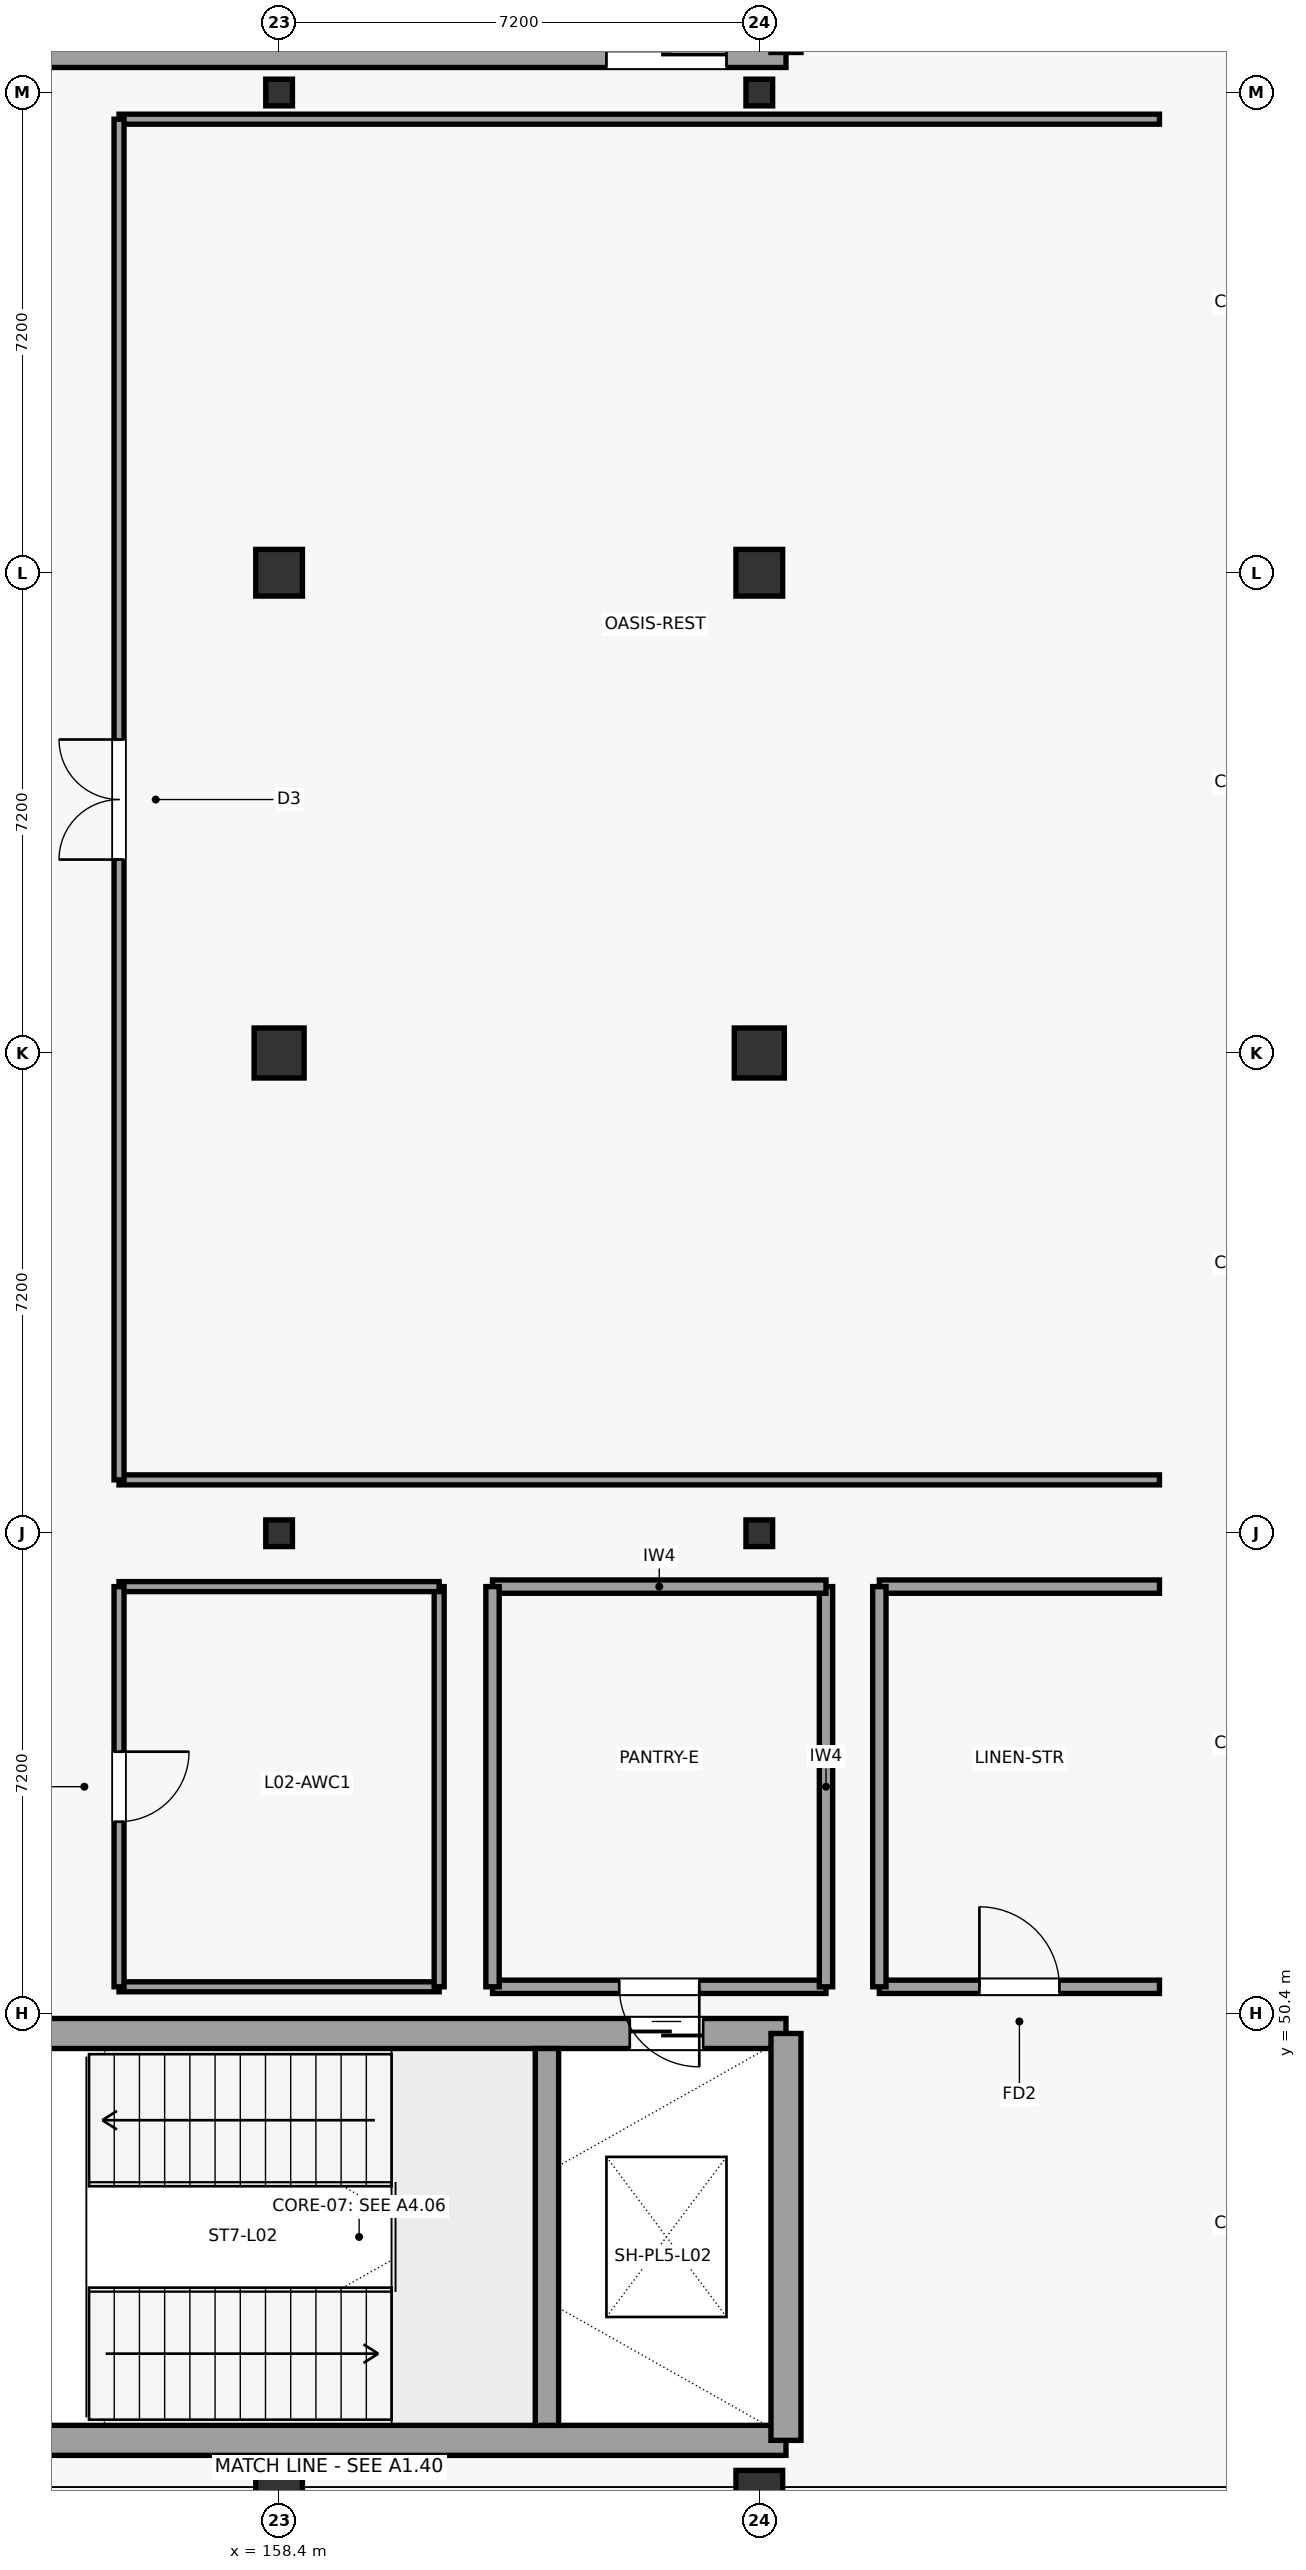
"""IFC4 building model, lengths in metres.
Left out: names, types, materials, properties, quantities, classifications, styles, units other than length and angle.
Written with IfcOpenShell. Run it as: python <this file> out.ifc"""

import sys

from ifc_helpers import new_model, si_unit, direction, frame, frame_2d, origin, origin_2d, place, context, subcontext, project, spatial, rectangle, hollow_rectangle, extrude, element, fill, save


model = new_model("IFC4")
c1 = context("Model", 3, precision=1e-05, world=origin(), true_north=direction((0.0, 1.0)))
c2 = subcontext(c1, "Body", "Model", "MODEL_VIEW")
j1 = project(units=[si_unit("LENGTHUNIT", "METRE"), si_unit("PLANEANGLEUNIT", "RADIAN")], contexts=[c1])
p1 = place(None, origin())
s1 = spatial("IfcSite", under=j1, at=p1, CompositionType="ELEMENT")
p2 = place(p1, origin())
s2 = spatial("IfcBuilding", under=s1, at=p2, CompositionType="ELEMENT")
p3 = place(p2, frame((0.0, 0.0, 9.6)))
s3 = spatial("IfcBuildingStorey", under=s2, at=p3, CompositionType="ELEMENT", Elevation=9.6)
p4 = place(p3, frame((158.4, 43.2, 0.0), z_axis=(0.0, 0.0, 1.0), x_axis=(1.0, 0.0, 0.0)))
e1 = element("IfcColumn", 1, at=p4, inside=s3, PredefinedType="COLUMN", context=c2, shape_type="SweptSolid", body=[
    extrude(rectangle(XDim=0.7, YDim=0.7, at=origin_2d()), origin(), (0.0, 0.0, 1.0), 4.2),
])
p5 = place(p3, frame((158.4, 57.6, 0.0), z_axis=(0.0, 0.0, 1.0), x_axis=(1.0, 0.0, 0.0)))
e2 = element("IfcColumn", 2, at=p5, inside=s3, PredefinedType="COLUMN", context=c2, shape_type="SweptSolid", body=[
    extrude(hollow_rectangle(XDim=0.4, YDim=0.4, WallThickness=0.02, at=origin_2d()), origin(), (0.0, 0.0, 1.0), 4.2),
])
p6 = place(p3, frame((158.4, 64.8, 0.0), z_axis=(0.0, 0.0, 1.0), x_axis=(1.0, 0.0, 0.0)))
e3 = element("IfcColumn", 3, at=p6, inside=s3, PredefinedType="COLUMN", context=c2, shape_type="SweptSolid", body=[
    extrude(rectangle(XDim=0.75, YDim=0.75, at=origin_2d()), origin(), (0.0, 0.0, 1.0), 4.2),
])
p7 = place(p3, frame((158.4, 72.0, 0.0), z_axis=(0.0, 0.0, 1.0), x_axis=(1.0, 0.0, 0.0)))
e4 = element("IfcColumn", 4, at=p7, inside=s3, PredefinedType="COLUMN", context=c2, shape_type="SweptSolid", body=[
    extrude(rectangle(XDim=0.7, YDim=0.7, at=origin_2d()), origin(), (0.0, 0.0, 1.0), 4.2),
])
p8 = place(p3, frame((158.4, 79.2, 0.0), z_axis=(0.0, 0.0, 1.0), x_axis=(1.0, 0.0, 0.0)))
e5 = element("IfcColumn", 5, at=p8, inside=s3, PredefinedType="COLUMN", context=c2, shape_type="SweptSolid", body=[
    extrude(hollow_rectangle(XDim=0.4, YDim=0.4, WallThickness=0.02, at=origin_2d()), origin(), (0.0, 0.0, 1.0), 4.2),
])
p9 = place(p3, frame((165.6, 43.2, 0.0), z_axis=(0.0, 0.0, 1.0), x_axis=(1.0, 0.0, 0.0)))
e6 = element("IfcColumn", 6, at=p9, inside=s3, PredefinedType="COLUMN", context=c2, shape_type="SweptSolid", body=[
    extrude(rectangle(XDim=0.7, YDim=0.7, at=origin_2d()), origin(), (0.0, 0.0, 1.0), 4.2),
])
p10 = place(p3, frame((165.6, 57.6, 0.0), z_axis=(0.0, 0.0, 1.0), x_axis=(1.0, 0.0, 0.0)))
e7 = element("IfcColumn", 7, at=p10, inside=s3, PredefinedType="COLUMN", context=c2, shape_type="SweptSolid", body=[
    extrude(hollow_rectangle(XDim=0.4, YDim=0.4, WallThickness=0.02, at=origin_2d()), origin(), (0.0, 0.0, 1.0), 4.2),
])
p11 = place(p3, frame((165.6, 64.8, 0.0), z_axis=(0.0, 0.0, 1.0), x_axis=(1.0, 0.0, 0.0)))
e8 = element("IfcColumn", 8, at=p11, inside=s3, PredefinedType="COLUMN", context=c2, shape_type="SweptSolid", body=[
    extrude(rectangle(XDim=0.75, YDim=0.75, at=origin_2d()), origin(), (0.0, 0.0, 1.0), 4.2),
])
p12 = place(p3, frame((165.6, 72.0, 0.0), z_axis=(0.0, 0.0, 1.0), x_axis=(1.0, 0.0, 0.0)))
e9 = element("IfcColumn", 9, at=p12, inside=s3, PredefinedType="COLUMN", context=c2, shape_type="SweptSolid", body=[
    extrude(rectangle(XDim=0.7, YDim=0.7, at=origin_2d()), origin(), (0.0, 0.0, 1.0), 4.2),
])
p13 = place(p3, frame((165.6, 79.2, 0.0), z_axis=(0.0, 0.0, 1.0), x_axis=(1.0, 0.0, 0.0)))
e10 = element("IfcColumn", 10, at=p13, inside=s3, PredefinedType="COLUMN", context=c2, shape_type="SweptSolid", body=[
    extrude(hollow_rectangle(XDim=0.4, YDim=0.4, WallThickness=0.02, at=origin_2d()), origin(), (0.0, 0.0, 1.0), 4.2),
])
p14 = place(p3, frame((153.2, 44.0, 0.0), z_axis=(0.0, 0.0, 1.0), x_axis=(1.0, 0.0, 0.0)))
e11 = element("IfcWall", 11, at=p14, inside=s3, PredefinedType="SHEAR", context=c2, shape_type="SweptSolid", body=[
    extrude(rectangle(XDim=12.8, YDim=0.45, at=frame_2d((6.4, 0.0))), origin(), (0.0, 0.0, 1.0), 3.88),
])
p15 = place(p3, frame((153.2, 50.1, 0.0), z_axis=(0.0, 0.0, 1.0), x_axis=(1.0, 0.0, 0.0)))
e12 = element("IfcWall", 12, at=p15, inside=s3, PredefinedType="SHEAR", context=c2, shape_type="SweptSolid", body=[
    extrude(rectangle(XDim=12.8, YDim=0.45, at=frame_2d((6.4, 0.0))), origin(), (0.0, 0.0, 1.0), 3.88),
])
p16 = place(p15, frame((0.55, 0.0, 0.0)))
e13 = element("IfcOpeningElement", 13, at=p16, cuts=e12, PredefinedType="OPENING", context=c2, shape_type="SweptSolid", body=[
    extrude(rectangle(XDim=1.2, YDim=2.25, at=frame_2d((0.6, 1.125))), frame((0.0, 0.235, 0.0), z_axis=(0.0, -1.0, 0.0), x_axis=(1.0, 0.0, 0.0)), (0.0, 0.0, 1.0), 0.47),
])
p17 = place(p15, frame((10.458, 0.0, 0.0)))
e14 = element("IfcOpeningElement", 14, at=p17, cuts=e12, PredefinedType="OPENING", context=c2, shape_type="SweptSolid", body=[
    extrude(rectangle(XDim=1.1, YDim=2.2, at=frame_2d((0.55, 1.1))), frame((0.0, 0.235, 0.0), z_axis=(0.0, -1.0, 0.0), x_axis=(1.0, 0.0, 0.0)), (0.0, 0.0, 1.0), 0.47),
])
p18 = place(p3, frame((166.0, 44.0, 0.0), z_axis=(0.0, 0.0, 1.0), x_axis=(0.0, 1.0, 0.0)))
e15 = element("IfcWall", 15, at=p18, inside=s3, PredefinedType="SHEAR", context=c2, shape_type="SweptSolid", body=[
    extrude(rectangle(XDim=6.1, YDim=0.45, at=frame_2d((3.05, 0.0))), origin(), (0.0, 0.0, 1.0), 3.88),
])
p19 = place(p3, frame((162.416, 44.225, 0.0), z_axis=(0.0, 0.0, 1.0), x_axis=(0.0, 1.0, 0.0)))
e16 = element("IfcWall", 16, at=p19, inside=s3, PredefinedType="SHEAR", context=c2, shape_type="SweptSolid", body=[
    extrude(rectangle(XDim=5.65, YDim=0.35, at=frame_2d((2.825, 0.0))), origin(), (0.0, 0.0, 1.0), 3.88),
])
p20 = place(p3, frame((153.2, 79.8, 0.0), z_axis=(0.0, 0.0, 1.0), x_axis=(1.0, 0.0, 0.0)))
e17 = element("IfcWall", 17, at=p20, inside=s3, PredefinedType="SHEAR", context=c2, shape_type="SweptSolid", body=[
    extrude(rectangle(XDim=12.8, YDim=0.45, at=frame_2d((6.4, 0.0))), origin(), (0.0, 0.0, 1.0), 3.88),
])
p21 = place(p20, frame((0.55, 0.0, 0.0)))
e18 = element("IfcOpeningElement", 18, at=p21, cuts=e17, PredefinedType="OPENING", context=c2, shape_type="SweptSolid", body=[
    extrude(rectangle(XDim=1.2, YDim=2.25, at=frame_2d((0.6, 1.125))), frame((0.0, 0.235, 0.0), z_axis=(0.0, -1.0, 0.0), x_axis=(1.0, 0.0, 0.0)), (0.0, 0.0, 1.0), 0.47),
])
p22 = place(p20, frame((10.108, 0.0, 0.0)))
e19 = element("IfcOpeningElement", 19, at=p22, cuts=e17, PredefinedType="OPENING", context=c2, shape_type="SweptSolid", body=[
    extrude(rectangle(XDim=1.8, YDim=2.4, at=frame_2d((0.9, 1.2))), frame((0.0, 0.235, 0.0), z_axis=(0.0, -1.0, 0.0), x_axis=(1.0, 0.0, 0.0)), (0.0, 0.0, 1.0), 0.47),
])
p23 = place(p3, frame((166.0, 79.8, 0.0), z_axis=(0.0, 0.0, 1.0), x_axis=(0.0, 1.0, 0.0)))
e20 = element("IfcWall", 20, at=p23, inside=s3, PredefinedType="SHEAR", context=c2, shape_type="SweptSolid", body=[
    extrude(rectangle(XDim=6.1, YDim=0.45, at=frame_2d((3.05, 0.0))), origin(), (0.0, 0.0, 1.0), 3.88),
])
for number, where, z_axis, x_axis in (
    (21, (156.0, 58.4, 0.0), (0.0, 0.0, 1.0), (1.0, 0.0, 0.0)),
    (22, (171.6, 78.8, 0.0), (0.0, 0.0, 1.0), (-1.0, 0.0, 0.0)),
):
    element("IfcWall", number, at=place(p3, frame(where, z_axis=z_axis, x_axis=x_axis)), inside=s3, PredefinedType="PARTITIONING", context=c2, shape_type="SweptSolid", body=[
        extrude(rectangle(XDim=15.6, YDim=0.15, at=frame_2d((7.8, 0.0))), origin(), (0.0, 0.0, 1.0), 2.94),
    ])
p24 = place(p3, frame((156.0, 78.8, 0.0), z_axis=(0.0, 0.0, 1.0), x_axis=(0.0, -1.0, 0.0)))
e23 = element("IfcWall", 23, at=p24, inside=s3, PredefinedType="PARTITIONING", context=c2, shape_type="SweptSolid", body=[
    extrude(rectangle(XDim=20.4, YDim=0.15, at=frame_2d((10.2, 0.0))), origin(), (0.0, 0.0, 1.0), 2.94),
])
p25 = place(p24, frame((9.3, 0.0, 0.0)))
e24 = element("IfcOpeningElement", 24, at=p25, cuts=e23, PredefinedType="OPENING", context=c2, shape_type="SweptSolid", body=[
    extrude(rectangle(XDim=1.8, YDim=2.3, at=frame_2d((0.9, 1.15))), frame((0.0, 0.085, 0.0), z_axis=(0.0, -1.0, 0.0), x_axis=(1.0, 0.0, 0.0)), (0.0, 0.0, 1.0), 0.17),
])
p26 = place(p3, frame((156.0, 50.8, 0.0), z_axis=(0.0, 0.0, 1.0), x_axis=(1.0, 0.0, 0.0)))
e25 = element("IfcWall", 25, at=p26, inside=s3, PredefinedType="PARTITIONING", context=c2, shape_type="SweptSolid", body=[
    extrude(rectangle(XDim=4.8, YDim=0.15, at=frame_2d((2.4, 0.0))), origin(), (0.0, 0.0, 1.0), 2.94),
])
p27 = place(p3, frame((160.8, 50.8, 0.0), z_axis=(0.0, 0.0, 1.0), x_axis=(0.0, 1.0, 0.0)))
e26 = element("IfcWall", 26, at=p27, inside=s3, PredefinedType="PARTITIONING", context=c2, shape_type="SweptSolid", body=[
    extrude(rectangle(XDim=6.0, YDim=0.15, at=frame_2d((3.0, 0.0))), origin(), (0.0, 0.0, 1.0), 2.94),
])
p28 = place(p3, frame((160.8, 56.8, 0.0), z_axis=(0.0, 0.0, 1.0), x_axis=(-1.0, 0.0, 0.0)))
e27 = element("IfcWall", 27, at=p28, inside=s3, PredefinedType="PARTITIONING", context=c2, shape_type="SweptSolid", body=[
    extrude(rectangle(XDim=4.8, YDim=0.15, at=frame_2d((2.4, 0.0))), origin(), (0.0, 0.0, 1.0), 2.94),
])
p29 = place(p3, frame((156.0, 56.8, 0.0), z_axis=(0.0, 0.0, 1.0), x_axis=(0.0, -1.0, 0.0)))
e28 = element("IfcWall", 28, at=p29, inside=s3, PredefinedType="PARTITIONING", context=c2, shape_type="SweptSolid", body=[
    extrude(rectangle(XDim=6.0, YDim=0.15, at=frame_2d((3.0, 0.0))), origin(), (0.0, 0.0, 1.0), 2.94),
])
p30 = place(p29, frame((2.475, 0.0, 0.0)))
e29 = element("IfcOpeningElement", 29, at=p30, cuts=e28, PredefinedType="OPENING", context=c2, shape_type="SweptSolid", body=[
    extrude(rectangle(XDim=1.05, YDim=2.2, at=frame_2d((0.525, 1.1))), frame((0.0, 0.085, 0.0), z_axis=(0.0, -1.0, 0.0), x_axis=(1.0, 0.0, 0.0)), (0.0, 0.0, 1.0), 0.17),
])
p31 = place(p3, frame((161.6, 50.8, 0.0), z_axis=(0.0, 0.0, 1.0), x_axis=(1.0, 0.0, 0.0)))
e30 = element("IfcWall", 30, at=p31, inside=s3, PredefinedType="PARTITIONING", context=c2, shape_type="SweptSolid", body=[
    extrude(rectangle(XDim=5.0, YDim=0.2, at=frame_2d((2.5, 0.0))), origin(), (0.0, 0.0, 1.0), 2.94),
])
p32 = place(p31, frame((1.9, 0.0, 0.0)))
e31 = element("IfcOpeningElement", 31, at=p32, cuts=e30, PredefinedType="OPENING", context=c2, shape_type="SweptSolid", body=[
    extrude(rectangle(XDim=1.2, YDim=2.25, at=frame_2d((0.6, 1.125))), frame((0.0, 0.11, 0.0), z_axis=(0.0, -1.0, 0.0), x_axis=(1.0, 0.0, 0.0)), (0.0, 0.0, 1.0), 0.22),
])
p33 = place(p3, frame((166.6, 50.8, 0.0), z_axis=(0.0, 0.0, 1.0), x_axis=(0.0, 1.0, 0.0)))
e32 = element("IfcWall", 32, at=p33, inside=s3, PredefinedType="PARTITIONING", context=c2, shape_type="SweptSolid", body=[
    extrude(rectangle(XDim=6.0, YDim=0.2, at=frame_2d((3.0, 0.0))), origin(), (0.0, 0.0, 1.0), 2.94),
])
p34 = place(p3, frame((166.6, 56.8, 0.0), z_axis=(0.0, 0.0, 1.0), x_axis=(-1.0, 0.0, 0.0)))
e33 = element("IfcWall", 33, at=p34, inside=s3, PredefinedType="PARTITIONING", context=c2, shape_type="SweptSolid", body=[
    extrude(rectangle(XDim=5.0, YDim=0.2, at=frame_2d((2.5, 0.0))), origin(), (0.0, 0.0, 1.0), 2.94),
])
p35 = place(p3, frame((161.6, 56.8, 0.0), z_axis=(0.0, 0.0, 1.0), x_axis=(0.0, -1.0, 0.0)))
e34 = element("IfcWall", 34, at=p35, inside=s3, PredefinedType="PARTITIONING", context=c2, shape_type="SweptSolid", body=[
    extrude(rectangle(XDim=6.0, YDim=0.2, at=frame_2d((3.0, 0.0))), origin(), (0.0, 0.0, 1.0), 2.94),
])
p36 = place(p3, frame((167.4, 50.8, 0.0), z_axis=(0.0, 0.0, 1.0), x_axis=(1.0, 0.0, 0.0)))
e35 = element("IfcWall", 35, at=p36, inside=s3, PredefinedType="PARTITIONING", context=c2, shape_type="SweptSolid", body=[
    extrude(rectangle(XDim=4.2, YDim=0.2, at=frame_2d((2.1, 0.0))), origin(), (0.0, 0.0, 1.0), 2.94),
])
p37 = place(p36, frame((1.5, 0.0, 0.0)))
e36 = element("IfcOpeningElement", 36, at=p37, cuts=e35, PredefinedType="OPENING", context=c2, shape_type="SweptSolid", body=[
    extrude(rectangle(XDim=1.2, YDim=2.25, at=frame_2d((0.6, 1.125))), frame((0.0, 0.11, 0.0), z_axis=(0.0, -1.0, 0.0), x_axis=(1.0, 0.0, 0.0)), (0.0, 0.0, 1.0), 0.22),
])
p38 = place(p3, frame((171.6, 56.8, 0.0), z_axis=(0.0, 0.0, 1.0), x_axis=(-1.0, 0.0, 0.0)))
e37 = element("IfcWall", 37, at=p38, inside=s3, PredefinedType="PARTITIONING", context=c2, shape_type="SweptSolid", body=[
    extrude(rectangle(XDim=4.2, YDim=0.2, at=frame_2d((2.1, 0.0))), origin(), (0.0, 0.0, 1.0), 2.94),
])
p39 = place(p3, frame((167.4, 56.8, 0.0), z_axis=(0.0, 0.0, 1.0), x_axis=(0.0, -1.0, 0.0)))
e38 = element("IfcWall", 38, at=p39, inside=s3, PredefinedType="PARTITIONING", context=c2, shape_type="SweptSolid", body=[
    extrude(rectangle(XDim=6.0, YDim=0.2, at=frame_2d((3.0, 0.0))), origin(), (0.0, 0.0, 1.0), 2.94),
])
p40 = place(p17, origin())
e39 = element("IfcDoor", 39, at=p40, inside=s3, OperationType="SLIDING_TO_RIGHT", PredefinedType="DOOR", context=c2, shape_type="SweptSolid", body=[
    extrude(rectangle(XDim=1.1, YDim=2.2, at=frame_2d((0.55, 1.1))), frame((0.0, 0.025, 0.0), z_axis=(0.0, -1.0, 0.0), x_axis=(1.0, 0.0, 0.0)), (0.0, 0.0, 1.0), 0.05),
])
fill(e14, e39)
p41 = place(p22, origin())
e40 = element("IfcDoor", 40, at=p41, inside=s3, OperationType="SLIDING_TO_RIGHT", PredefinedType="DOOR", context=c2, shape_type="SweptSolid", body=[
    extrude(rectangle(XDim=1.8, YDim=2.4, at=frame_2d((0.9, 1.2))), frame((0.0, 0.025, 0.0), z_axis=(0.0, -1.0, 0.0), x_axis=(1.0, 0.0, 0.0)), (0.0, 0.0, 1.0), 0.05),
])
fill(e19, e40)
p42 = place(p25, frame((1.8, 0.0, 0.0), z_axis=(0.0, 0.0, 1.0), x_axis=(-1.0, 0.0, 0.0)))
e41 = element("IfcDoor", 41, at=p42, inside=s3, OperationType="DOUBLE_DOOR_SINGLE_SWING", PredefinedType="DOOR", context=c2, shape_type="SweptSolid", body=[
    extrude(rectangle(XDim=1.8, YDim=2.3, at=frame_2d((0.9, 1.15))), frame((0.0, 0.025, 0.0), z_axis=(0.0, -1.0, 0.0), x_axis=(1.0, 0.0, 0.0)), (0.0, 0.0, 1.0), 0.05),
])
fill(e24, e41)
p43 = place(p30, origin())
e42 = element("IfcDoor", 42, at=p43, inside=s3, OperationType="SINGLE_SWING_LEFT", PredefinedType="DOOR", context=c2, shape_type="SweptSolid", body=[
    extrude(rectangle(XDim=1.05, YDim=2.2, at=frame_2d((0.525, 1.1))), frame((0.0, 0.025, 0.0), z_axis=(0.0, -1.0, 0.0), x_axis=(1.0, 0.0, 0.0)), (0.0, 0.0, 1.0), 0.05),
])
fill(e29, e42)
p44 = place(p32, frame((1.2, 0.0, 0.0), z_axis=(0.0, 0.0, 1.0), x_axis=(-1.0, 0.0, 0.0)))
e43 = element("IfcDoor", 43, at=p44, inside=s3, OperationType="SINGLE_SWING_RIGHT", PredefinedType="DOOR", context=c2, shape_type="SweptSolid", body=[
    extrude(rectangle(XDim=1.2, YDim=2.25, at=frame_2d((0.6, 1.125))), frame((0.0, 0.025, 0.0), z_axis=(0.0, -1.0, 0.0), x_axis=(1.0, 0.0, 0.0)), (0.0, 0.0, 1.0), 0.05),
])
fill(e31, e43)
p45 = place(p37, origin())
e44 = element("IfcDoor", 44, at=p45, inside=s3, OperationType="SINGLE_SWING_LEFT", PredefinedType="DOOR", context=c2, shape_type="SweptSolid", body=[
    extrude(rectangle(XDim=1.2, YDim=2.25, at=frame_2d((0.6, 1.125))), frame((0.0, 0.025, 0.0), z_axis=(0.0, -1.0, 0.0), x_axis=(1.0, 0.0, 0.0)), (0.0, 0.0, 1.0), 0.05),
])
fill(e36, e44)
save(model, sys.argv[1])
